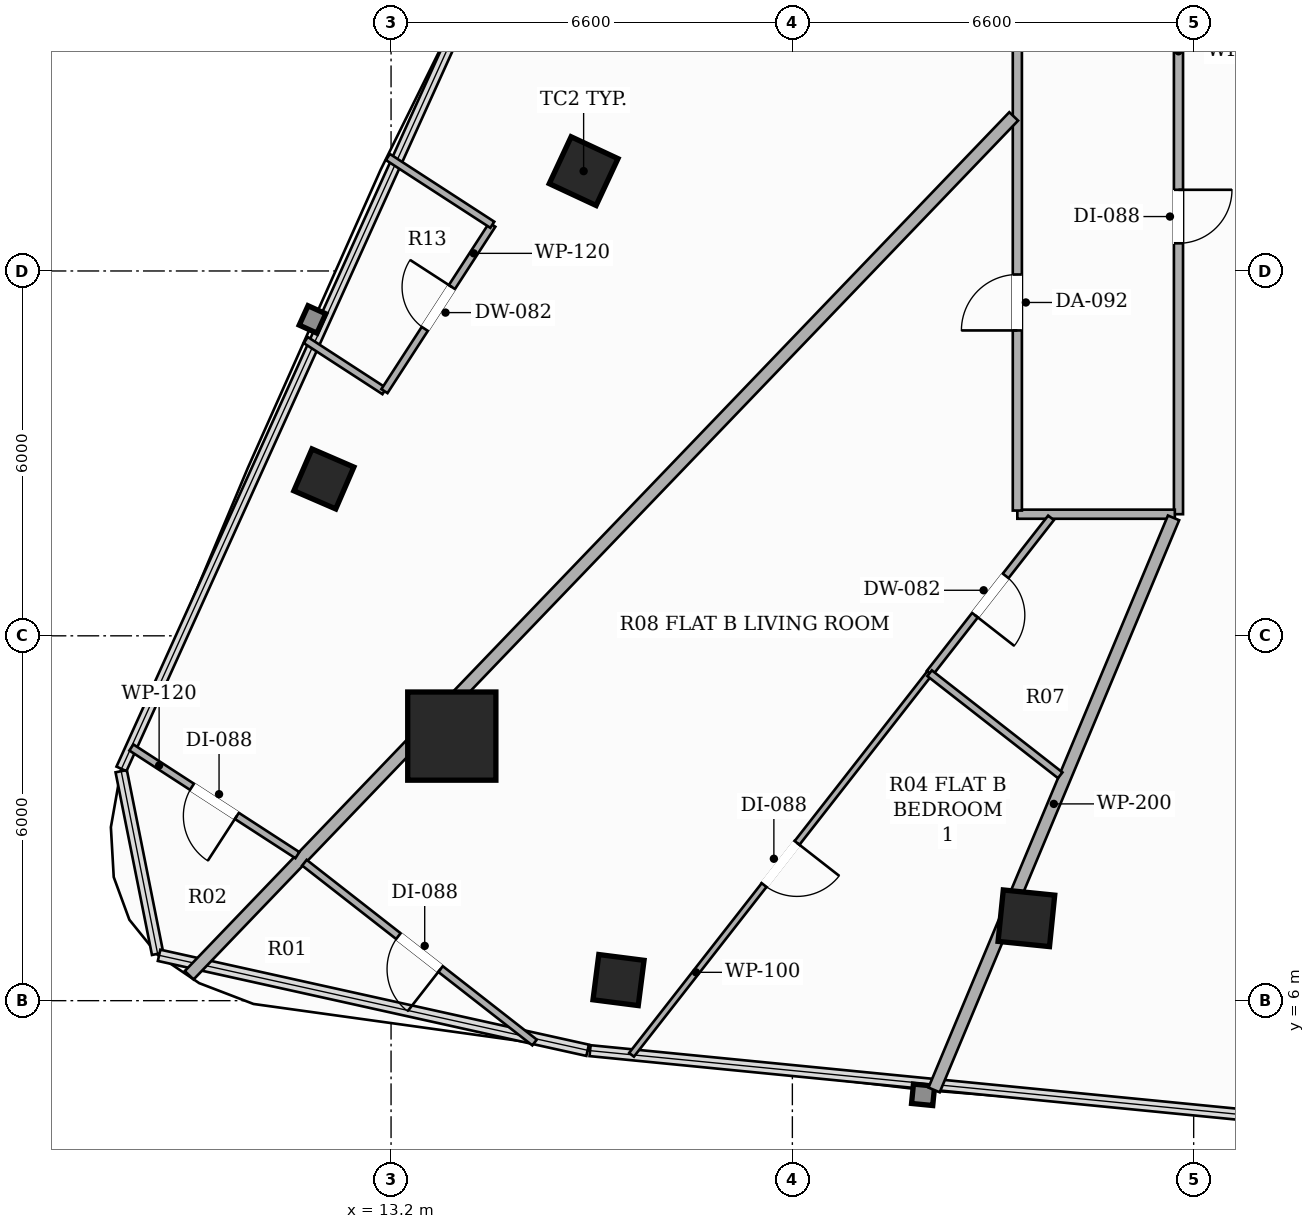
"""IFC4 building model, lengths in metres.
Left out: names, types, materials, properties, quantities, classifications, styles, units other than length and angle.
Written with IfcOpenShell. Run it as: python <this file> out.ifc"""

import sys

from ifc_helpers import new_model, si_unit, direction, frame, frame_2d, origin, origin_2d, place, context, subcontext, project, spatial, rectangle, hollow_rectangle, extrude, element, fill, save


model = new_model("IFC4")
c1 = context("Model", 3, precision=1e-05, world=origin(), true_north=direction((0.0, 1.0)))
c2 = subcontext(c1, "Body", "Model", "MODEL_VIEW")
j1 = project(units=[si_unit("LENGTHUNIT", "METRE"), si_unit("PLANEANGLEUNIT", "RADIAN")], contexts=[c1])
p1 = place(None, origin())
s1 = spatial("IfcSite", under=j1, at=p1, CompositionType="ELEMENT")
p2 = place(p1, origin())
s2 = spatial("IfcBuilding", under=s1, at=p2, CompositionType="ELEMENT")
p3 = place(p2, frame((0.0, 0.0, 183.65)))
s3 = spatial("IfcBuildingStorey", under=s2, at=p3, CompositionType="ELEMENT", Elevation=183.65)
p4 = place(p3, frame((14.199, 10.351, 0.0), z_axis=(0.0, 0.0, 1.0), x_axis=(1.0, 0.0, 0.0)))
e1 = element("IfcColumn", 1, at=p4, inside=s3, PredefinedType="COLUMN", context=c2, shape_type="SweptSolid", body=[
    extrude(hollow_rectangle(XDim=1.45, YDim=1.45, WallThickness=0.045, at=origin_2d()), origin(), (0.0, 0.0, 1.0), 3.3),
])
for number, where, z_axis, x_axis in (
    (2, (16.367, 19.642, 0.0), (0.0, 0.0, 1.0), (0.423, 0.906, 0.0)),
    (3, (23.649, 7.355, 0.0), (0.0, 0.0, 1.0), (-0.995, 0.101, 0.0)),
):
    element("IfcColumn", number, at=place(p3, frame(where, z_axis=z_axis, x_axis=x_axis)), inside=s3, PredefinedType="COLUMN", context=c2, shape_type="SweptSolid", body=[
        extrude(hollow_rectangle(XDim=0.85, YDim=0.85, WallThickness=0.028, at=origin_2d()), origin(), (0.0, 0.0, 1.0), 3.3),
    ])
for number, where, z_axis, x_axis in (
    (4, (12.095, 14.58, 0.0), (0.0, 0.0, 1.0), (0.397, 0.918, 0.0)),
    (5, (16.941, 6.339, 0.0), (0.0, 0.0, 1.0), (-0.992, 0.127, 0.0)),
):
    element("IfcColumn", number, at=place(p3, frame(where, z_axis=z_axis, x_axis=x_axis)), inside=s3, PredefinedType="COLUMN", context=c2, shape_type="SweptSolid", body=[
        extrude(hollow_rectangle(XDim=0.75, YDim=0.75, WallThickness=0.025, at=origin_2d()), origin(), (0.0, 0.0, 1.0), 3.3),
    ])
p5 = place(p3, frame((26.15, 23.79, 0.0), z_axis=(0.0, 0.0, 1.0), x_axis=(0.0, -1.0, 0.0)))
e6 = element("IfcWall", 6, at=p5, inside=s3, PredefinedType="PARTITIONING", context=c2, shape_type="SweptSolid", body=[
    extrude(rectangle(XDim=9.79, YDim=0.15, at=frame_2d((4.895, 0.0))), origin(), (0.0, 0.0, 1.0), 2.681),
])
p6 = place(p5, frame((4.455, 0.0, 0.0)))
e7 = element("IfcOpeningElement", 7, at=p6, cuts=e6, PredefinedType="OPENING", context=c2, shape_type="SweptSolid", body=[
    extrude(rectangle(XDim=0.88, YDim=2.1, at=frame_2d((0.44, 1.05))), frame((0.0, 0.085, 0.0), z_axis=(0.0, -1.0, 0.0), x_axis=(1.0, 0.0, 0.0)), (0.0, 0.0, 1.0), 0.17),
])
p7 = place(p3, frame((26.09, 14.0, 0.0), z_axis=(0.0, 0.0, 1.0), x_axis=(-1.0, 0.0, 0.0)))
e8 = element("IfcWall", 8, at=p7, inside=s3, PredefinedType="PARTITIONING", context=c2, shape_type="SweptSolid", body=[
    extrude(rectangle(XDim=2.59, YDim=0.15, at=frame_2d((1.295, 0.0))), origin(), (0.0, 0.0, 1.0), 2.681),
])
p8 = place(p3, frame((23.5, 14.06, 0.0), z_axis=(0.0, 0.0, 1.0), x_axis=(0.0, 1.0, 0.0)))
e9 = element("IfcWall", 9, at=p8, inside=s3, PredefinedType="PARTITIONING", context=c2, shape_type="SweptSolid", body=[
    extrude(rectangle(XDim=23.181, YDim=0.15, at=frame_2d((11.59, 0.0))), origin(), (0.0, 0.0, 1.0), 2.373),
])
p9 = place(p8, frame((14.184, 0.0, 0.0)))
e10 = element("IfcOpeningElement", 10, at=p9, cuts=e9, PredefinedType="OPENING", context=c2, shape_type="SweptSolid", body=[
    extrude(rectangle(XDim=0.92, YDim=2.15, at=frame_2d((0.46, 1.075))), frame((0.0, 0.085, 0.0), z_axis=(0.0, -1.0, 0.0), x_axis=(1.0, 0.0, 0.0)), (0.0, 0.0, 1.0), 0.17),
])
p10 = place(p8, frame((2.962, 0.0, 0.0)))
e11 = element("IfcOpeningElement", 11, at=p10, cuts=e9, PredefinedType="OPENING", context=c2, shape_type="SweptSolid", body=[
    extrude(rectangle(XDim=0.92, YDim=2.15, at=frame_2d((0.46, 1.075))), frame((0.0, 0.085, 0.0), z_axis=(0.0, -1.0, 0.0), x_axis=(1.0, 0.0, 0.0)), (0.0, 0.0, 1.0), 0.17),
])
p11 = place(p3, frame((22.131, 4.532, 0.0), z_axis=(0.0, 0.0, 1.0), x_axis=(0.38611914038, 0.922448919687, 0.0)))
e12 = element("IfcWall", 12, at=p11, inside=s3, PredefinedType="PARTITIONING", context=c2, shape_type="SweptSolid", body=[
    extrude(rectangle(XDim=10.199, YDim=0.2, at=frame_2d((5.1, 0.0))), origin(), (0.0, 0.0, 1.0), 2.373),
])
p12 = place(p3, frame((23.44, 20.542, 0.0), z_axis=(0.0, 0.0, 1.0), x_axis=(-0.692558302481, -0.721361904777, 0.0)))
e13 = element("IfcWall", 13, at=p12, inside=s3, PredefinedType="PARTITIONING", context=c2, shape_type="SweptSolid", body=[
    extrude(rectangle(XDim=19.58, YDim=0.2, at=frame_2d((9.79, 0.0))), origin(), (0.0, 0.0, 1.0), 2.373),
])
p13 = place(p3, frame((11.797, 16.864, 0.0), z_axis=(0.0, 0.0, 1.0), x_axis=(0.838732745172, -0.544543278516, 0.0)))
e14 = element("IfcWall", 14, at=p13, inside=s3, PredefinedType="PARTITIONING", context=c2, shape_type="SweptSolid", body=[
    extrude(rectangle(XDim=1.543, YDim=0.12, at=frame_2d((0.771, 0.0))), origin(), (0.0, 0.0, 1.0), 2.373),
])
p14 = place(p3, frame((13.091, 16.024, 0.0), z_axis=(0.0, 0.0, 1.0), x_axis=(0.544011633561, 0.839077673729, 0.0)))
e15 = element("IfcWall", 15, at=p14, inside=s3, PredefinedType="PARTITIONING", context=c2, shape_type="SweptSolid", body=[
    extrude(rectangle(XDim=3.261, YDim=0.12, at=frame_2d((1.63, 0.0))), origin(), (0.0, 0.0, 1.0), 2.373),
])
p15 = place(p14, frame((1.22, 0.0, 0.0)))
e16 = element("IfcOpeningElement", 16, at=p15, cuts=e15, PredefinedType="OPENING", context=c2, shape_type="SweptSolid", body=[
    extrude(rectangle(XDim=0.82, YDim=2.1, at=frame_2d((0.41, 1.05))), frame((0.0, 0.07, 0.0), z_axis=(0.0, -1.0, 0.0), x_axis=(1.0, 0.0, 0.0)), (0.0, 0.0, 1.0), 0.14),
])
p16 = place(p3, frame((14.865, 18.76, 0.0), z_axis=(0.0, 0.0, 1.0), x_axis=(-0.838903880254, 0.544279596986, 0.0)))
e17 = element("IfcWall", 17, at=p16, inside=s3, PredefinedType="PARTITIONING", context=c2, shape_type="SweptSolid", body=[
    extrude(rectangle(XDim=2.047, YDim=0.12, at=frame_2d((1.023, 0.0))), origin(), (0.0, 0.0, 1.0), 3.02),
])
p17 = place(p3, frame((11.659, 8.393, 0.0), z_axis=(0.0, 0.0, 1.0), x_axis=(-0.838933513053, 0.544233920916, 0.0)))
e18 = element("IfcWall", 18, at=p17, inside=s3, PredefinedType="PARTITIONING", context=c2, shape_type="SweptSolid", body=[
    extrude(rectangle(XDim=3.254, YDim=0.12, at=frame_2d((1.627, 0.0))), origin(), (0.0, 0.0, 1.0), 3.02),
])
p18 = place(p17, frame((1.186, 0.0, 0.0)))
e19 = element("IfcOpeningElement", 19, at=p18, cuts=e18, PredefinedType="OPENING", context=c2, shape_type="SweptSolid", body=[
    extrude(rectangle(XDim=0.88, YDim=2.1, at=frame_2d((0.44, 1.05))), frame((0.0, 0.07, 0.0), z_axis=(0.0, -1.0, 0.0), x_axis=(1.0, 0.0, 0.0)), (0.0, 0.0, 1.0), 0.14),
])
p19 = place(p3, frame((24.054, 13.94, 0.0), z_axis=(0.0, 0.0, 1.0), x_axis=(-0.615841255229, -0.787870261121, 0.0)))
e20 = element("IfcWall", 20, at=p19, inside=s3, PredefinedType="PARTITIONING", context=c2, shape_type="SweptSolid", body=[
    extrude(rectangle(XDim=3.243, YDim=0.12, at=frame_2d((1.622, 0.0))), origin(), (0.0, 0.0, 1.0), 2.681),
])
p20 = place(p19, frame((1.211, 0.0, 0.0)))
e21 = element("IfcOpeningElement", 21, at=p20, cuts=e20, PredefinedType="OPENING", context=c2, shape_type="SweptSolid", body=[
    extrude(rectangle(XDim=0.82, YDim=2.1, at=frame_2d((0.41, 1.05))), frame((0.0, 0.07, 0.0), z_axis=(0.0, -1.0, 0.0), x_axis=(1.0, 0.0, 0.0)), (0.0, 0.0, 1.0), 0.14),
])
p21 = place(p3, frame((15.56, 5.312, 0.0), z_axis=(0.0, 0.0, 1.0), x_axis=(-0.788036702969, 0.615628260214, 0.0)))
e22 = element("IfcWall", 22, at=p21, inside=s3, PredefinedType="PARTITIONING", context=c2, shape_type="SweptSolid", body=[
    extrude(rectangle(XDim=4.803, YDim=0.12, at=frame_2d((2.402, 0.0))), origin(), (0.0, 0.0, 1.0), 3.02),
])
p22 = place(p21, frame((1.962, 0.0, 0.0)))
e23 = element("IfcOpeningElement", 23, at=p22, cuts=e22, PredefinedType="OPENING", context=c2, shape_type="SweptSolid", body=[
    extrude(rectangle(XDim=0.88, YDim=2.1, at=frame_2d((0.44, 1.05))), frame((0.0, 0.07, 0.0), z_axis=(0.0, -1.0, 0.0), x_axis=(1.0, 0.0, 0.0)), (0.0, 0.0, 1.0), 0.14),
])
p23 = place(p3, frame((22.057, 11.385, 0.0), z_axis=(0.0, 0.0, 1.0), x_axis=(-0.61561191154, -0.78804947457, 0.0)))
e24 = element("IfcWall", 24, at=p23, inside=s3, PredefinedType="PARTITIONING", context=c2, shape_type="SweptSolid", body=[
    extrude(rectangle(XDim=7.963, YDim=0.1, at=frame_2d((3.981, 0.0))), origin(), (0.0, 0.0, 1.0), 2.373),
])
p24 = place(p23, frame((3.541, 0.0, 0.0)))
e25 = element("IfcOpeningElement", 25, at=p24, cuts=e24, PredefinedType="OPENING", context=c2, shape_type="SweptSolid", body=[
    extrude(rectangle(XDim=0.88, YDim=2.1, at=frame_2d((0.44, 1.05))), frame((0.0, 0.06, 0.0), z_axis=(0.0, -1.0, 0.0), x_axis=(1.0, 0.0, 0.0)), (0.0, 0.0, 1.0), 0.12),
])
p25 = place(p3, frame((24.205, 9.707, 0.0), z_axis=(0.0, 0.0, 1.0), x_axis=(-0.788077327334, 0.615576255343, 0.0)))
e26 = element("IfcWall", 26, at=p25, inside=s3, PredefinedType="PARTITIONING", context=c2, shape_type="SweptSolid", body=[
    extrude(rectangle(XDim=2.726, YDim=0.12, at=frame_2d((1.363, 0.0))), origin(), (0.0, 0.0, 1.0), 2.681),
])
p26 = place(p6, origin())
e27 = element("IfcDoor", 27, at=p26, inside=s3, OperationType="SINGLE_SWING_LEFT", PredefinedType="DOOR", context=c2, shape_type="SweptSolid", body=[
    extrude(rectangle(XDim=0.88, YDim=2.1, at=frame_2d((0.44, 1.05))), frame((0.0, 0.025, 0.0), z_axis=(0.0, -1.0, 0.0), x_axis=(1.0, 0.0, 0.0)), (0.0, 0.0, 1.0), 0.05),
])
fill(e7, e27)
p27 = place(p15, origin())
e28 = element("IfcDoor", 28, at=p27, inside=s3, OperationType="SINGLE_SWING_RIGHT", PredefinedType="DOOR", context=c2, shape_type="SweptSolid", body=[
    extrude(rectangle(XDim=0.82, YDim=2.1, at=frame_2d((0.41, 1.05))), frame((0.0, 0.025, 0.0), z_axis=(0.0, -1.0, 0.0), x_axis=(1.0, 0.0, 0.0)), (0.0, 0.0, 1.0), 0.05),
])
fill(e16, e28)
p28 = place(p18, origin())
e29 = element("IfcDoor", 29, at=p28, inside=s3, OperationType="SINGLE_SWING_LEFT", PredefinedType="DOOR", context=c2, shape_type="SweptSolid", body=[
    extrude(rectangle(XDim=0.88, YDim=2.1, at=frame_2d((0.44, 1.05))), frame((0.0, 0.025, 0.0), z_axis=(0.0, -1.0, 0.0), x_axis=(1.0, 0.0, 0.0)), (0.0, 0.0, 1.0), 0.05),
])
fill(e19, e29)
p29 = place(p10, origin())
e30 = element("IfcDoor", 30, at=p29, inside=s3, OperationType="SINGLE_SWING_LEFT", PredefinedType="DOOR", context=c2, shape_type="SweptSolid", body=[
    extrude(rectangle(XDim=0.92, YDim=2.15, at=frame_2d((0.46, 1.075))), frame((0.0, 0.025, 0.0), z_axis=(0.0, -1.0, 0.0), x_axis=(1.0, 0.0, 0.0)), (0.0, 0.0, 1.0), 0.05),
])
fill(e11, e30)
p30 = place(p20, origin())
e31 = element("IfcDoor", 31, at=p30, inside=s3, OperationType="SINGLE_SWING_RIGHT", PredefinedType="DOOR", context=c2, shape_type="SweptSolid", body=[
    extrude(rectangle(XDim=0.82, YDim=2.1, at=frame_2d((0.41, 1.05))), frame((0.0, 0.025, 0.0), z_axis=(0.0, -1.0, 0.0), x_axis=(1.0, 0.0, 0.0)), (0.0, 0.0, 1.0), 0.05),
])
fill(e21, e31)
p31 = place(p22, origin())
e32 = element("IfcDoor", 32, at=p31, inside=s3, OperationType="SINGLE_SWING_LEFT", PredefinedType="DOOR", context=c2, shape_type="SweptSolid", body=[
    extrude(rectangle(XDim=0.88, YDim=2.1, at=frame_2d((0.44, 1.05))), frame((0.0, 0.025, 0.0), z_axis=(0.0, -1.0, 0.0), x_axis=(1.0, 0.0, 0.0)), (0.0, 0.0, 1.0), 0.05),
])
fill(e23, e32)
p32 = place(p24, origin())
e33 = element("IfcDoor", 33, at=p32, inside=s3, OperationType="SINGLE_SWING_LEFT", PredefinedType="DOOR", context=c2, shape_type="SweptSolid", body=[
    extrude(rectangle(XDim=0.88, YDim=2.1, at=frame_2d((0.44, 1.05))), frame((0.0, 0.025, 0.0), z_axis=(0.0, -1.0, 0.0), x_axis=(1.0, 0.0, 0.0)), (0.0, 0.0, 1.0), 0.05),
])
fill(e25, e33)
save(model, sys.argv[1])
